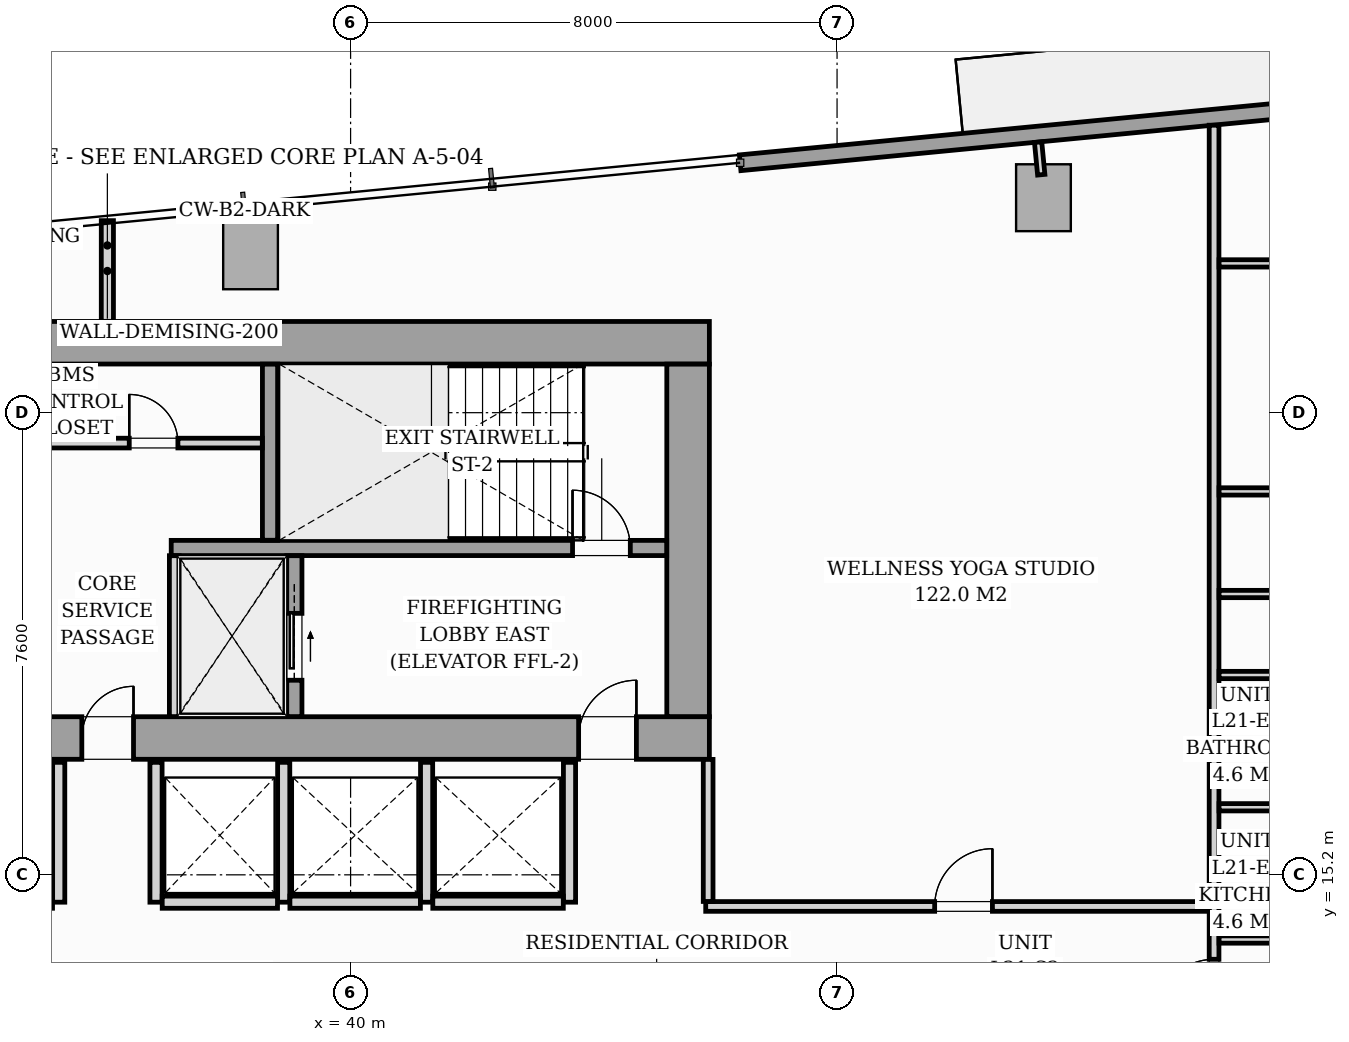
"""IFC4 building model, lengths in metres.
Left out: names, types, materials, properties, quantities, classifications, styles, units other than length and angle.
Written with IfcOpenShell. Run it as: python <this file> out.ifc"""

import sys

from ifc_helpers import new_model, si_unit, direction, frame, frame_2d, origin, origin_2d, place, context, subcontext, project, spatial, rectangle, i_section, extrude, source, transform, mapped, element, fill, save


model = new_model("IFC4")
c1 = context("Model", 3, precision=1e-05, world=origin(), true_north=direction((0.0, 1.0)))
c2 = subcontext(c1, "Body", "Model", "MODEL_VIEW")
j1 = project(units=[si_unit("LENGTHUNIT", "METRE"), si_unit("PLANEANGLEUNIT", "RADIAN")], contexts=[c1])
p1 = place(None, origin())
s1 = spatial("IfcSite", under=j1, at=p1, CompositionType="ELEMENT")
p2 = place(p1, origin())
s2 = spatial("IfcBuilding", under=s1, at=p2, CompositionType="ELEMENT")
p3 = place(p2, frame((0.0, 0.0, 77.8)))
s3 = spatial("IfcBuildingStorey", under=s2, at=p3, CompositionType="ELEMENT", Elevation=77.8)
m1 = source(origin(), c2, "Body", "SweptSolid", [
    extrude(i_section(OverallWidth=0.427, OverallDepth=0.483, WebThickness=0.051, FlangeThickness=0.082, FilletRadius=0.018, at=origin_2d()), origin(), (0.0, 0.0, 1.0), 3.196),
])
for number, where, z_axis, x_axis in (
    (1, (38.88, 17.4, 0.002), (0.0, 0.0, 1.0), (1.0, 0.0, 0.0)),
    (2, (45.6, 17.4, 0.002), (0.0, 0.0, 1.0), (1.0, 0.0, 0.0)),
    (3, (38.88, 24.0, 0.002), (0.0, 0.0, 1.0), (1.0, 0.0, 0.0)),
    (4, (45.6, 24.0, 0.002), (0.0, 0.0, 1.0), (1.0, 0.0, 0.0)),
):
    element("IfcColumn", number, at=place(p3, frame(where, z_axis=z_axis, x_axis=x_axis)), inside=s3, PredefinedType="PILASTER", context=c2, shape_type="MappedRepresentation", body=[
        mapped(m1, transform((0.0, 0.0, 0.0), scale=1.0)),
    ])
m2 = source(origin(), c2, "Body", "SweptSolid", [
    extrude(rectangle(XDim=0.9, YDim=1.1, at=origin_2d()), origin(), (0.0, 0.0, 1.0), 3.194),
])
for number, where, z_axis, x_axis in (
    (5, (38.354, 25.38, 0.004), (0.0, 0.0, 1.0), (0.995, 0.096, 0.0)),
    (6, (51.394, 26.335, 0.004), (0.0, 0.0, 1.0), (0.995, 0.096, 0.0)),
):
    element("IfcColumn", number, at=place(p3, frame(where, z_axis=z_axis, x_axis=x_axis)), inside=s3, PredefinedType="COLUMN", context=c2, shape_type="MappedRepresentation", body=[
        mapped(m2, transform((0.0, 0.0, 0.0), scale=1.0)),
    ])
p4 = place(p3, frame((46.406, 26.91, 0.0), z_axis=(0.0, 0.0, 1.0), x_axis=(0.995396638587, 0.095841180552, 0.0)))
e7 = element("IfcWall", 7, at=p4, inside=s3, PredefinedType="STANDARD", context=c2, shape_type="SweptSolid", body=[
    extrude(rectangle(XDim=19.11, YDim=0.26, at=frame_2d((9.555, 0.0))), origin(), (0.0, 0.0, 1.0), 2.94),
])
p5 = place(p4, frame((9.77, 0.0, 0.0)))
e8 = element("IfcOpeningElement", 8, at=p5, cuts=e7, PredefinedType="OPENING", context=c2, shape_type="SweptSolid", body=[
    extrude(rectangle(XDim=1.8, YDim=2.06, at=frame_2d((0.9, 1.03))), frame((0.0, 0.14, 0.0), z_axis=(0.0, -1.0, 0.0), x_axis=(1.0, 0.0, 0.0)), (0.0, 0.0, 1.0), 0.28),
])
p6 = place(p3, frame((26.1, 17.45, 0.0), z_axis=(0.0, 0.0, 1.0), x_axis=(1.0, 0.0, 0.0)))
e9 = element("IfcWall", 9, at=p6, inside=s3, PredefinedType="SHEAR", context=c2, shape_type="SweptSolid", body=[
    extrude(rectangle(XDim=19.8, YDim=0.7, at=frame_2d((9.9, 0.0))), origin(), (0.0, 0.0, 1.0), 3.2),
])
p7 = place(p6, frame((1.05, 0.0, 0.0)))
e10 = element("IfcOpeningElement", 10, at=p7, cuts=e9, PredefinedType="OPENING", context=c2, shape_type="SweptSolid", body=[
    extrude(rectangle(XDim=0.95, YDim=2.06, at=frame_2d((0.475, 1.03))), frame((0.0, 0.36, 0.0), z_axis=(0.0, -1.0, 0.0), x_axis=(1.0, 0.0, 0.0)), (0.0, 0.0, 1.0), 0.72),
])
p8 = place(p6, frame((9.48, 0.0, 0.0)))
e11 = element("IfcOpeningElement", 11, at=p8, cuts=e9, PredefinedType="OPENING", context=c2, shape_type="SweptSolid", body=[
    extrude(rectangle(XDim=0.85, YDim=2.0, at=frame_2d((0.425, 1.0))), frame((0.0, 0.36, 0.0), z_axis=(0.0, -1.0, 0.0), x_axis=(1.0, 0.0, 0.0)), (0.0, 0.0, 1.0), 0.72),
])
p9 = place(p6, frame((17.65, 0.0, 0.0)))
e12 = element("IfcOpeningElement", 12, at=p9, cuts=e9, PredefinedType="OPENING", context=c2, shape_type="SweptSolid", body=[
    extrude(rectangle(XDim=0.95, YDim=2.06, at=frame_2d((0.475, 1.03))), frame((0.0, 0.36, 0.0), z_axis=(0.0, -1.0, 0.0), x_axis=(1.0, 0.0, 0.0)), (0.0, 0.0, 1.0), 0.72),
])
p10 = place(p3, frame((26.1, 23.95, 0.0), z_axis=(0.0, 0.0, 1.0), x_axis=(1.0, 0.0, 0.0)))
e13 = element("IfcWall", 13, at=p10, inside=s3, PredefinedType="SHEAR", context=c2, shape_type="SweptSolid", body=[
    extrude(rectangle(XDim=19.8, YDim=0.7, at=frame_2d((9.9, 0.0))), origin(), (0.0, 0.0, 1.0), 3.2),
])
p11 = place(p3, frame((45.55, 17.802, 0.0), z_axis=(0.0, 0.0, 1.0), x_axis=(0.0, 1.0, 0.0)))
e14 = element("IfcWall", 14, at=p11, inside=s3, PredefinedType="SHEAR", context=c2, shape_type="SweptSolid", body=[
    extrude(rectangle(XDim=5.796, YDim=0.7, at=frame_2d((2.898, 0.0))), origin(), (0.0, 0.0, 1.0), 3.2),
])
p12 = place(p3, frame((37.05, 20.575, 0.0), z_axis=(0.0, 0.0, 1.0), x_axis=(1.0, 0.0, 0.0)))
e15 = element("IfcWall", 15, at=p12, inside=s3, PredefinedType="SOLIDWALL", context=c2, shape_type="SweptSolid", body=[
    extrude(rectangle(XDim=8.148, YDim=0.25, at=frame_2d((4.074, 0.0))), origin(), (0.0, 0.0, 1.0), 3.2),
])
p13 = place(p12, frame((6.6, 0.0, 0.0)))
e16 = element("IfcOpeningElement", 16, at=p13, cuts=e15, PredefinedType="OPENING", context=c2, shape_type="SweptSolid", body=[
    extrude(rectangle(XDim=0.95, YDim=2.06, at=frame_2d((0.475, 1.03))), frame((0.0, 0.135, 0.0), z_axis=(0.0, -1.0, 0.0), x_axis=(1.0, 0.0, 0.0)), (0.0, 0.0, 1.0), 0.27),
])
p14 = place(p3, frame((38.675, 20.702, 0.0), z_axis=(0.0, 0.0, 1.0), x_axis=(0.0, 1.0, 0.0)))
e17 = element("IfcWall", 17, at=p14, inside=s3, PredefinedType="SOLIDWALL", context=c2, shape_type="SweptSolid", body=[
    extrude(rectangle(XDim=2.896, YDim=0.25, at=frame_2d((1.448, 0.0))), origin(), (0.0, 0.0, 1.0), 3.2),
])
p15 = place(p3, frame((37.1, 17.802, 0.0), z_axis=(0.0, 0.0, 1.0), x_axis=(0.0, 1.0, 0.0)))
e18 = element("IfcWall", 18, at=p15, inside=s3, PredefinedType="PARTITIONING", context=c2, shape_type="SweptSolid", body=[
    extrude(rectangle(XDim=2.646, YDim=0.16, at=frame_2d((1.323, 0.0))), origin(), (0.0, 0.0, 1.0), 2.94),
])
p16 = place(p3, frame((39.075, 17.802, 0.0), z_axis=(0.0, 0.0, 1.0), x_axis=(0.0, 1.0, 0.0)))
e19 = element("IfcWall", 19, at=p16, inside=s3, PredefinedType="SOLIDWALL", context=c2, shape_type="SweptSolid", body=[
    extrude(rectangle(XDim=2.646, YDim=0.25, at=frame_2d((1.323, 0.0))), origin(), (0.0, 0.0, 1.0), 3.2),
])
p17 = place(p16, frame((0.598, 0.0, 0.0)))
e20 = element("IfcOpeningElement", 20, at=p17, cuts=e19, PredefinedType="OPENING", context=c2, shape_type="SweptSolid", body=[
    extrude(rectangle(XDim=1.1, YDim=2.08, at=frame_2d((0.55, 1.04))), frame((0.0, 0.135, 0.0), z_axis=(0.0, -1.0, 0.0), x_axis=(1.0, 0.0, 0.0)), (0.0, 0.0, 1.0), 0.27),
])
p18 = place(p3, frame((34.982, 22.3, 0.0), z_axis=(0.0, 0.0, 1.0), x_axis=(1.0, 0.0, 0.0)))
e21 = element("IfcWall", 21, at=p18, inside=s3, PredefinedType="PARTITIONING", context=c2, shape_type="SweptSolid", body=[
    extrude(rectangle(XDim=3.566, YDim=0.16, at=frame_2d((1.783, 0.0))), origin(), (0.0, 0.0, 1.0), 2.94),
])
p19 = place(p18, frame((1.378, 0.0, 0.0)))
e22 = element("IfcOpeningElement", 22, at=p19, cuts=e21, PredefinedType="OPENING", context=c2, shape_type="SweptSolid", body=[
    extrude(rectangle(XDim=0.8, YDim=2.05, at=frame_2d((0.4, 1.025))), frame((0.0, 0.09, 0.0), z_axis=(0.0, -1.0, 0.0), x_axis=(1.0, 0.0, 0.0)), (0.0, 0.0, 1.0), 0.18),
])
for number, where, z_axis, x_axis in (
    (23, (35.2, 14.75, 0.0), (0.0, 0.0, 1.0), (0.0, 1.0, 0.0)),
    (24, (36.8, 14.75, 0.0), (0.0, 0.0, 1.0), (0.0, 1.0, 0.0)),
    (25, (38.9, 14.75, 0.0), (0.0, 0.0, 1.0), (0.0, 1.0, 0.0)),
):
    element("IfcWall", number, at=place(p3, frame(where, z_axis=z_axis, x_axis=x_axis)), inside=s3, PredefinedType="PARTITIONING", context=c2, shape_type="SweptSolid", body=[
        extrude(rectangle(XDim=2.3, YDim=0.2, at=frame_2d((1.15, 0.0))), origin(), (0.0, 0.0, 1.0), 2.94),
    ])
p20 = place(p3, frame((36.902, 14.75, 0.0), z_axis=(0.0, 0.0, 1.0), x_axis=(1.0, 0.0, 0.0)))
e26 = element("IfcWall", 26, at=p20, inside=s3, PredefinedType="PARTITIONING", context=c2, shape_type="SweptSolid", body=[
    extrude(rectangle(XDim=1.896, YDim=0.2, at=frame_2d((0.948, 0.0))), origin(), (0.0, 0.0, 1.0), 2.94),
])
for number, where, z_axis, x_axis in (
    (27, (41.25, 14.75, 0.0), (0.0, 0.0, 1.0), (0.0, 1.0, 0.0)),
    (28, (43.6, 14.75, 0.0), (0.0, 0.0, 1.0), (0.0, 1.0, 0.0)),
):
    element("IfcWall", number, at=place(p3, frame(where, z_axis=z_axis, x_axis=x_axis)), inside=s3, PredefinedType="PARTITIONING", context=c2, shape_type="SweptSolid", body=[
        extrude(rectangle(XDim=2.3, YDim=0.2, at=frame_2d((1.15, 0.0))), origin(), (0.0, 0.0, 1.0), 2.94),
    ])
for number, where, z_axis, x_axis in (
    (29, (39.002, 14.75, 0.0), (0.0, 0.0, 1.0), (1.0, 0.0, 0.0)),
    (30, (41.352, 14.75, 0.0), (0.0, 0.0, 1.0), (1.0, 0.0, 0.0)),
):
    element("IfcWall", number, at=place(p3, frame(where, z_axis=z_axis, x_axis=x_axis)), inside=s3, PredefinedType="PARTITIONING", context=c2, shape_type="SweptSolid", body=[
        extrude(rectangle(XDim=2.146, YDim=0.2, at=frame_2d((1.073, 0.0))), origin(), (0.0, 0.0, 1.0), 2.94),
    ])
p21 = place(p3, frame((54.2, 12.432, 0.0), z_axis=(0.0, 0.0, 1.0), x_axis=(0.0, 1.0, 0.0)))
e31 = element("IfcWall", 31, at=p21, inside=s3, PredefinedType="PARTITIONING", context=c2, shape_type="SweptSolid", body=[
    extrude(rectangle(XDim=15.095, YDim=0.16, at=frame_2d((7.548, 0.0))), origin(), (0.0, 0.0, 1.0), 2.94),
])
p22 = place(p21, frame((0.429, 0.0, 0.0)))
e32 = element("IfcOpeningElement", 32, at=p22, cuts=e31, PredefinedType="OPENING", context=c2, shape_type="SweptSolid", body=[
    extrude(rectangle(XDim=0.95, YDim=2.06, at=frame_2d((0.475, 1.03))), frame((0.0, 0.09, 0.0), z_axis=(0.0, -1.0, 0.0), x_axis=(1.0, 0.0, 0.0)), (0.0, 0.0, 1.0), 0.18),
])
p23 = place(p3, frame((36.0, 24.302, 0.0), z_axis=(0.0, 0.0, 1.0), x_axis=(0.0, 1.0, 0.0)))
e33 = element("IfcWall", 33, at=p23, inside=s3, PredefinedType="PARTITIONING", context=c2, shape_type="SweptSolid", body=[
    extrude(rectangle(XDim=1.656, YDim=0.2, at=frame_2d((0.828, 0.0))), origin(), (0.0, 0.0, 1.0), 2.94),
])
for number, where, z_axis, x_axis in (
    (34, (54.282, 16.311, 0.0), (0.0, 0.0, 1.0), (1.0, 0.0, 0.0)),
    (35, (54.282, 14.136, 0.0), (0.0, 0.0, 1.0), (1.0, 0.0, 0.0)),
    (36, (54.282, 18.486, 0.0), (0.0, 0.0, 1.0), (1.0, 0.0, 0.0)),
):
    element("IfcWall", number, at=place(p3, frame(where, z_axis=z_axis, x_axis=x_axis)), inside=s3, PredefinedType="PARTITIONING", context=c2, shape_type="SweptSolid", body=[
        extrude(rectangle(XDim=2.256, YDim=0.12, at=frame_2d((1.128, 0.0))), origin(), (0.0, 0.0, 1.0), 2.94),
    ])
p24 = place(p3, frame((54.282, 25.255, 0.0), z_axis=(0.0, 0.0, 1.0), x_axis=(1.0, 0.0, 0.0)))
e37 = element("IfcWall", 37, at=p24, inside=s3, PredefinedType="PARTITIONING", context=c2, shape_type="SweptSolid", body=[
    extrude(rectangle(XDim=6.901, YDim=0.12, at=frame_2d((3.451, 0.0))), origin(), (0.0, 0.0, 1.0), 2.94),
])
p25 = place(p24, frame((3.056, 0.0, 0.0)))
e38 = element("IfcOpeningElement", 38, at=p25, cuts=e37, PredefinedType="OPENING", context=c2, shape_type="SweptSolid", body=[
    extrude(rectangle(XDim=0.85, YDim=2.05, at=frame_2d((0.425, 1.025))), frame((0.0, 0.07, 0.0), z_axis=(0.0, -1.0, 0.0), x_axis=(1.0, 0.0, 0.0)), (0.0, 0.0, 1.0), 0.14),
])
p26 = place(p3, frame((54.282, 21.505, 0.0), z_axis=(0.0, 0.0, 1.0), x_axis=(1.0, 0.0, 0.0)))
e39 = element("IfcWall", 39, at=p26, inside=s3, PredefinedType="PARTITIONING", context=c2, shape_type="SweptSolid", body=[
    extrude(rectangle(XDim=14.274, YDim=0.12, at=frame_2d((7.137, 0.0))), origin(), (0.0, 0.0, 1.0), 2.94),
])
p27 = place(p26, frame((4.853, 0.0, 0.0)))
e40 = element("IfcOpeningElement", 40, at=p27, cuts=e39, PredefinedType="OPENING", context=c2, shape_type="SweptSolid", body=[
    extrude(rectangle(XDim=0.85, YDim=2.05, at=frame_2d((0.425, 1.025))), frame((0.0, 0.07, 0.0), z_axis=(0.0, -1.0, 0.0), x_axis=(1.0, 0.0, 0.0)), (0.0, 0.0, 1.0), 0.14),
])
p28 = place(p3, frame((54.282, 19.818, 0.0), z_axis=(0.0, 0.0, 1.0), x_axis=(1.0, 0.0, 0.0)))
e41 = element("IfcWall", 41, at=p28, inside=s3, PredefinedType="PARTITIONING", context=c2, shape_type="SweptSolid", body=[
    extrude(rectangle(XDim=14.437, YDim=0.12, at=frame_2d((7.218, 0.0))), origin(), (0.0, 0.0, 1.0), 2.94),
])
p29 = place(p28, frame((4.853, 0.0, 0.0)))
e42 = element("IfcOpeningElement", 42, at=p29, cuts=e41, PredefinedType="OPENING", context=c2, shape_type="SweptSolid", body=[
    extrude(rectangle(XDim=0.85, YDim=2.05, at=frame_2d((0.425, 1.025))), frame((0.0, 0.07, 0.0), z_axis=(0.0, -1.0, 0.0), x_axis=(1.0, 0.0, 0.0)), (0.0, 0.0, 1.0), 0.14),
])
p30 = place(p3, frame((45.84, 14.68, 0.0), z_axis=(0.0, 0.0, 1.0), x_axis=(1.0, 0.0, 0.0)))
e43 = element("IfcWall", 43, at=p30, inside=s3, PredefinedType="PARTITIONING", context=c2, shape_type="SweptSolid", body=[
    extrude(rectangle(XDim=8.278, YDim=0.16, at=frame_2d((4.139, 0.0))), origin(), (0.0, 0.0, 1.0), 2.94),
])
p31 = place(p30, frame((3.765, 0.0, 0.0)))
e44 = element("IfcOpeningElement", 44, at=p31, cuts=e43, PredefinedType="OPENING", context=c2, shape_type="SweptSolid", body=[
    extrude(rectangle(XDim=0.95, YDim=2.06, at=frame_2d((0.475, 1.03))), frame((0.0, 0.09, 0.0), z_axis=(0.0, -1.0, 0.0), x_axis=(1.0, 0.0, 0.0)), (0.0, 0.0, 1.0), 0.18),
])
p32 = place(p3, frame((45.88, 14.762, 0.0), z_axis=(0.0, 0.0, 1.0), x_axis=(0.0, 1.0, 0.0)))
e45 = element("IfcWall", 45, at=p32, inside=s3, PredefinedType="PARTITIONING", context=c2, shape_type="SweptSolid", body=[
    extrude(rectangle(XDim=2.336, YDim=0.16, at=frame_2d((1.168, 0.0))), origin(), (0.0, 0.0, 1.0), 2.94),
])
p33 = place(p3, frame((51.358, 26.713, 0.0), z_axis=(0.0, 0.0, 1.0), x_axis=(-0.095772948675, 0.995403205893, 0.0)))
e46 = element("IfcWall", 46, at=p33, inside=s3, PredefinedType="PARTITIONING", context=c2, shape_type="SweptSolid", body=[
    extrude(rectangle(XDim=0.538, YDim=0.12, at=frame_2d((0.269, 0.0))), origin(), (0.0, 0.0, 1.0), 2.94),
])
m3 = source(origin(), c2, "Body", "SweptSolid", [
    extrude(rectangle(XDim=0.85, YDim=2.0, at=frame_2d((0.425, 1.0))), frame((0.0, 0.025, 0.0), z_axis=(0.0, -1.0, 0.0), x_axis=(1.0, 0.0, 0.0)), (0.0, 0.0, 1.0), 0.05),
])
p34 = place(p8, origin())
e47 = element("IfcDoor", 47, at=p34, inside=s3, OperationType="SINGLE_SWING_RIGHT", PredefinedType="DOOR", context=c2, shape_type="MappedRepresentation", body=[
    mapped(m3, transform((0.0, 0.0, 0.0), scale=1.0)),
])
fill(e11, e47)
m4 = source(origin(), c2, "Body", "SweptSolid", [
    extrude(rectangle(XDim=0.95, YDim=2.06, at=frame_2d((0.475, 1.03))), frame((0.0, 0.025, 0.0), z_axis=(0.0, -1.0, 0.0), x_axis=(1.0, 0.0, 0.0)), (0.0, 0.0, 1.0), 0.05),
])
p35 = place(p9, origin())
e48 = element("IfcDoor", 48, at=p35, inside=s3, OperationType="SINGLE_SWING_RIGHT", PredefinedType="DOOR", context=c2, shape_type="MappedRepresentation", body=[
    mapped(m4, transform((0.0, 0.0, 0.0), scale=1.0)),
])
fill(e12, e48)
p36 = place(p13, origin())
e49 = element("IfcDoor", 49, at=p36, inside=s3, OperationType="SINGLE_SWING_LEFT", PredefinedType="DOOR", context=c2, shape_type="MappedRepresentation", body=[
    mapped(m4, transform((0.0, 0.0, 0.0), scale=1.0)),
])
fill(e16, e49)
m5 = source(origin(), c2, "Body", "SweptSolid", [
    extrude(rectangle(XDim=1.1, YDim=2.08, at=frame_2d((0.55, 1.04))), frame((0.0, 0.025, 0.0), z_axis=(0.0, -1.0, 0.0), x_axis=(1.0, 0.0, 0.0)), (0.0, 0.0, 1.0), 0.05),
])
p37 = place(p17, origin())
e50 = element("IfcDoor", 50, at=p37, inside=s3, OperationType="SLIDING_TO_RIGHT", PredefinedType="DOOR", context=c2, shape_type="MappedRepresentation", body=[
    mapped(m5, transform((0.0, 0.0, 0.0), scale=1.0)),
])
fill(e20, e50)
m6 = source(origin(), c2, "Body", "SweptSolid", [
    extrude(rectangle(XDim=0.8, YDim=2.05, at=frame_2d((0.4, 1.025))), frame((0.0, 0.025, 0.0), z_axis=(0.0, -1.0, 0.0), x_axis=(1.0, 0.0, 0.0)), (0.0, 0.0, 1.0), 0.05),
])
p38 = place(p19, origin())
e51 = element("IfcDoor", 51, at=p38, inside=s3, OperationType="SINGLE_SWING_LEFT", PredefinedType="DOOR", context=c2, shape_type="MappedRepresentation", body=[
    mapped(m6, transform((0.0, 0.0, 0.0), scale=1.0)),
])
fill(e22, e51)
m7 = source(origin(), c2, "Body", "SweptSolid", [
    extrude(rectangle(XDim=0.95, YDim=2.06, at=frame_2d((0.475, 1.03))), frame((0.0, 0.025, 0.0), z_axis=(0.0, -1.0, 0.0), x_axis=(1.0, 0.0, 0.0)), (0.0, 0.0, 1.0), 0.05),
])
p39 = place(p22, origin())
e52 = element("IfcDoor", 52, at=p39, inside=s3, OperationType="SINGLE_SWING_LEFT", PredefinedType="DOOR", context=c2, shape_type="MappedRepresentation", body=[
    mapped(m7, transform((0.0, 0.0, 0.0), scale=1.0)),
])
fill(e32, e52)
p40 = place(p31, origin())
e53 = element("IfcDoor", 53, at=p40, inside=s3, OperationType="SINGLE_SWING_RIGHT", PredefinedType="DOOR", context=c2, shape_type="MappedRepresentation", body=[
    mapped(m7, transform((0.0, 0.0, 0.0), scale=1.0)),
])
fill(e44, e53)
save(model, sys.argv[1])
